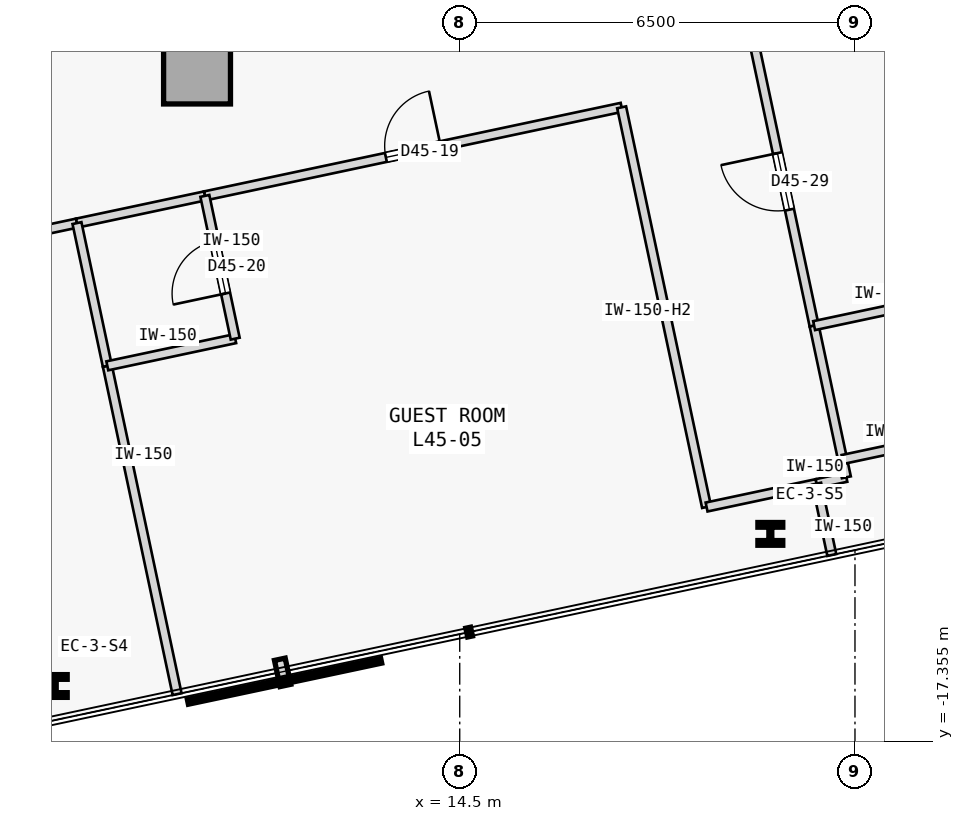
"""IFC4 building model, lengths in metres.
Left out: names, types, materials, properties, quantities, classifications, styles, units other than length and angle.
Written with IfcOpenShell. Run it as: python <this file> out.ifc"""

import sys

from ifc_helpers import new_model, si_unit, direction, frame, frame_2d, origin, origin_2d, place, context, subcontext, project, spatial, rectangle, i_section, extrude, element, fill, save


model = new_model("IFC4")
c1 = context("Model", 3, precision=1e-05, world=origin(), true_north=direction((0.0, 1.0)))
c2 = subcontext(c1, "Body", "Model", "MODEL_VIEW")
j1 = project(units=[si_unit("LENGTHUNIT", "METRE"), si_unit("PLANEANGLEUNIT", "RADIAN")], contexts=[c1])
p1 = place(None, origin())
s1 = spatial("IfcSite", under=j1, at=p1, CompositionType="ELEMENT")
p2 = place(p1, origin())
s2 = spatial("IfcBuilding", under=s1, at=p2, CompositionType="ELEMENT")
p3 = place(p2, frame((0.0, 0.0, 175.2)))
s3 = spatial("IfcBuildingStorey", under=s2, at=p3, CompositionType="ELEMENT", Elevation=175.2)
p4 = place(p3, frame((10.18, -6.32, 0.0), z_axis=(0.0, 0.0, 1.0), x_axis=(1.0, 0.0, 0.0)))
e1 = element("IfcColumn", 1, at=p4, inside=s3, PredefinedType="COLUMN", context=c2, shape_type="SweptSolid", body=[
    extrude(rectangle(XDim=1.1, YDim=1.1, at=origin_2d()), origin(), (0.0, 0.0, 1.0), 3.4),
])
for number, where, z_axis, x_axis in (
    (2, (7.84, -16.441, 0.0), (0.0, 0.0, 1.0), (1.0, 0.0, 0.0)),
    (3, (19.608, -13.94, 0.0), (0.0, 0.0, 1.0), (1.0, 0.0, 0.0)),
):
    element("IfcColumn", number, at=place(p3, frame(where, z_axis=z_axis, x_axis=x_axis)), inside=s3, PredefinedType="COLUMN", context=c2, shape_type="SweptSolid", body=[
        extrude(i_section(OverallWidth=0.409, OverallDepth=0.374, WebThickness=0.048, FlangeThickness=0.077, FilletRadius=0.015, at=origin_2d()), origin(), (0.0, 0.0, 1.0), 3.4),
    ])
p5 = place(p3, frame((-1.803, -10.957, 0.0), z_axis=(0.0, 0.0, 1.0), x_axis=(0.978145386425, 0.207922108048, 0.0)))
e4 = element("IfcWall", 4, at=p5, inside=s3, PredefinedType="PARTITIONING", context=c2, shape_type="SweptSolid", body=[
    extrude(rectangle(XDim=10.232, YDim=0.15, at=frame_2d((5.116, 0.0))), origin(), (0.0, 0.0, 1.0), 3.175),
])
p6 = place(p5, frame((4.656, 0.0, 0.0)))
e5 = element("IfcOpeningElement", 5, at=p6, cuts=e4, PredefinedType="OPENING", context=c2, shape_type="SweptSolid", body=[
    extrude(rectangle(XDim=0.92, YDim=2.15, at=frame_2d((0.46, 1.075))), frame((0.0, 0.085, 0.0), z_axis=(0.0, -1.0, 0.0), x_axis=(1.0, 0.0, 0.0)), (0.0, 0.0, 1.0), 0.17),
])
p7 = place(p3, frame((10.309, -8.382, 0.0), z_axis=(0.0, 0.0, 1.0), x_axis=(0.978149817889, 0.207901259648, 0.0)))
e6 = element("IfcWall", 6, at=p7, inside=s3, PredefinedType="PARTITIONING", context=c2, shape_type="SweptSolid", body=[
    extrude(rectangle(XDim=7.007, YDim=0.15, at=frame_2d((3.503, 0.0))), origin(), (0.0, 0.0, 1.0), 3.175),
])
p8 = place(p7, frame((3.043, 0.0, 0.0)))
e7 = element("IfcOpeningElement", 7, at=p8, cuts=e6, PredefinedType="OPENING", context=c2, shape_type="SweptSolid", body=[
    extrude(rectangle(XDim=0.92, YDim=2.15, at=frame_2d((0.46, 1.075))), frame((0.0, 0.085, 0.0), z_axis=(0.0, -1.0, 0.0), x_axis=(1.0, 0.0, 0.0)), (0.0, 0.0, 1.0), 0.17),
])
p9 = place(p3, frame((18.56, -13.498, 0.0), z_axis=(0.0, 0.0, 1.0), x_axis=(-0.207888737749, 0.978152479278, 0.0)))
e8 = element("IfcWall", 8, at=p9, inside=s3, PredefinedType="PARTITIONING", context=c2, shape_type="SweptSolid", body=[
    extrude(rectangle(XDim=6.72, YDim=0.15, at=frame_2d((3.36, 0.0))), origin(), (0.0, 0.0, 1.0), 2.575),
])
p10 = place(p3, frame((18.56, -13.498, 0.0), z_axis=(0.0, 0.0, 1.0), x_axis=(0.978160192495, 0.207852442415, 0.0)))
e9 = element("IfcWall", 9, at=p10, inside=s3, PredefinedType="PARTITIONING", context=c2, shape_type="SweptSolid", body=[
    extrude(rectangle(XDim=1.85, YDim=0.15, at=frame_2d((0.925, 0.0))), origin(), (0.0, 0.0, 1.0), 3.175),
])
p11 = place(p3, frame((8.206, -8.829, 0.0), z_axis=(0.0, 0.0, 1.0), x_axis=(0.978146728319, 0.207915795165, 0.0)))
e10 = element("IfcWall", 10, at=p11, inside=s3, PredefinedType="PARTITIONING", context=c2, shape_type="SweptSolid", body=[
    extrude(rectangle(XDim=2.15, YDim=0.15, at=frame_2d((1.075, 0.0))), origin(), (0.0, 0.0, 1.0), 3.175),
])
p12 = place(p3, frame((20.369, -13.114, 0.0), z_axis=(0.0, 0.0, 1.0), x_axis=(0.978143962546, 0.207928806409, 0.0)))
e11 = element("IfcWall", 11, at=p12, inside=s3, PredefinedType="PARTITIONING", context=c2, shape_type="SweptSolid", body=[
    extrude(rectangle(XDim=0.5, YDim=0.15, at=frame_2d((0.25, 0.0))), origin(), (0.0, 0.0, 1.0), 3.175),
])
p13 = place(p3, frame((20.858, -13.01, 0.0), z_axis=(0.0, 0.0, 1.0), x_axis=(-0.208306395052, 0.978063620518, 0.0)))
e12 = element("IfcWall", 12, at=p13, inside=s3, PredefinedType="PARTITIONING", context=c2, shape_type="SweptSolid", body=[
    extrude(rectangle(XDim=0.3, YDim=0.15, at=frame_2d((0.15, 0.0))), origin(), (0.0, 0.0, 1.0), 3.175),
])
p14 = place(p3, frame((20.328, -10.515, 0.0), z_axis=(0.0, 0.0, 1.0), x_axis=(-0.207950868925, 0.97813927235, 0.0)))
e13 = element("IfcWall", 13, at=p14, inside=s3, PredefinedType="PARTITIONING", context=c2, shape_type="SweptSolid", body=[
    extrude(rectangle(XDim=4.85, YDim=0.15, at=frame_2d((2.425, 0.0))), origin(), (0.0, 0.0, 1.0), 3.175),
])
p15 = place(p14, frame((1.95, 0.0, 0.0)))
e14 = element("IfcOpeningElement", 14, at=p15, cuts=e13, PredefinedType="OPENING", context=c2, shape_type="SweptSolid", body=[
    extrude(rectangle(XDim=0.95, YDim=2.15, at=frame_2d((0.475, 1.075))), frame((0.0, 0.085, 0.0), z_axis=(0.0, -1.0, 0.0), x_axis=(1.0, 0.0, 0.0)), (0.0, 0.0, 1.0), 0.17),
])
p16 = place(p3, frame((20.796, -12.716, 0.0), z_axis=(0.0, 0.0, 1.0), x_axis=(-0.207891197838, 0.978151956427, 0.0)))
e15 = element("IfcWall", 15, at=p16, inside=s3, PredefinedType="PARTITIONING", context=c2, shape_type="SweptSolid", body=[
    extrude(rectangle(XDim=2.25, YDim=0.15, at=frame_2d((1.125, 0.0))), origin(), (0.0, 0.0, 1.0), 3.175),
])
p17 = place(p3, frame((9.852, -16.576, 0.0), z_axis=(0.0, 0.0, 1.0), x_axis=(-0.20792487872, 0.978144797466, 0.0)))
e16 = element("IfcWall", 16, at=p17, inside=s3, PredefinedType="PARTITIONING", context=c2, shape_type="SweptSolid", body=[
    extrude(rectangle(XDim=5.52, YDim=0.15, at=frame_2d((2.76, 0.0))), origin(), (0.0, 0.0, 1.0), 3.175),
])
p18 = place(p3, frame((8.705, -11.177, 0.0), z_axis=(0.0, 0.0, 1.0), x_axis=(-0.207917150959, 0.978146440129, 0.0)))
e17 = element("IfcWall", 17, at=p18, inside=s3, PredefinedType="PARTITIONING", context=c2, shape_type="SweptSolid", body=[
    extrude(rectangle(XDim=2.4, YDim=0.15, at=frame_2d((1.2, 0.0))), origin(), (0.0, 0.0, 1.0), 3.175),
])
p19 = place(p3, frame((8.705, -11.177, 0.0), z_axis=(0.0, 0.0, 1.0), x_axis=(0.978123629285, 0.208024435669, 0.0)))
e18 = element("IfcWall", 18, at=p19, inside=s3, PredefinedType="PARTITIONING", context=c2, shape_type="SweptSolid", body=[
    extrude(rectangle(XDim=2.15, YDim=0.15, at=frame_2d((1.075, 0.0))), origin(), (0.0, 0.0, 1.0), 3.175),
])
p20 = place(p3, frame((10.808, -10.729, 0.0), z_axis=(0.0, 0.0, 1.0), x_axis=(-0.207937840262, 0.978142042133, 0.0)))
e19 = element("IfcWall", 19, at=p20, inside=s3, PredefinedType="PARTITIONING", context=c2, shape_type="SweptSolid", body=[
    extrude(rectangle(XDim=2.4, YDim=0.15, at=frame_2d((1.2, 0.0))), origin(), (0.0, 0.0, 1.0), 3.175),
])
p21 = place(p20, frame((0.76, 0.0, 0.0)))
e20 = element("IfcOpeningElement", 20, at=p21, cuts=e19, PredefinedType="OPENING", context=c2, shape_type="SweptSolid", body=[
    extrude(rectangle(XDim=0.88, YDim=2.15, at=frame_2d((0.44, 1.075))), frame((0.0, 0.085, 0.0), z_axis=(0.0, -1.0, 0.0), x_axis=(1.0, 0.0, 0.0)), (0.0, 0.0, 1.0), 0.17),
])
p22 = place(p3, frame((20.619, -14.288, 0.0), z_axis=(0.0, 0.0, 1.0), x_axis=(-0.207917150959, 0.978146440129, 0.0)))
e21 = element("IfcWall", 21, at=p22, inside=s3, PredefinedType="PARTITIONING", context=c2, shape_type="SweptSolid", body=[
    extrude(rectangle(XDim=1.2, YDim=0.15, at=frame_2d((0.6, 0.0))), origin(), (0.0, 0.0, 1.0), 3.175),
])
for number, where, z_axis, x_axis in (
    (22, (20.796, -12.716, 0.0), (0.0, 0.0, 1.0), (0.978, 0.208, 0.0)),
    (23, (20.328, -10.515, 0.0), (0.0, 0.0, 1.0), (0.978, 0.208, 0.0)),
):
    element("IfcWall", number, at=place(p3, frame(where, z_axis=z_axis, x_axis=x_axis)), inside=s3, PredefinedType="PARTITIONING", context=c2, shape_type="SweptSolid", body=[
        extrude(rectangle(XDim=1.85, YDim=0.15, at=frame_2d((0.925, 0.0))), origin(), (0.0, 0.0, 1.0), 3.175),
    ])
p23 = place(p8, origin())
e24 = element("IfcDoor", 24, at=p23, inside=s3, OperationType="SINGLE_SWING_RIGHT", PredefinedType="DOOR", context=c2, shape_type="SweptSolid", body=[
    extrude(rectangle(XDim=0.92, YDim=2.15, at=frame_2d((0.46, 1.075))), frame((0.0, 0.025, 0.0), z_axis=(0.0, -1.0, 0.0), x_axis=(1.0, 0.0, 0.0)), (0.0, 0.0, 1.0), 0.05),
])
fill(e7, e24)
p24 = place(p21, origin())
e25 = element("IfcDoor", 25, at=p24, inside=s3, OperationType="SINGLE_SWING_LEFT", PredefinedType="DOOR", context=c2, shape_type="SweptSolid", body=[
    extrude(rectangle(XDim=0.88, YDim=2.15, at=frame_2d((0.44, 1.075))), frame((0.0, 0.025, 0.0), z_axis=(0.0, -1.0, 0.0), x_axis=(1.0, 0.0, 0.0)), (0.0, 0.0, 1.0), 0.05),
])
fill(e20, e25)
p25 = place(p15, origin())
e26 = element("IfcDoor", 26, at=p25, inside=s3, OperationType="SINGLE_SWING_RIGHT", PredefinedType="DOOR", context=c2, shape_type="SweptSolid", body=[
    extrude(rectangle(XDim=0.95, YDim=2.15, at=frame_2d((0.475, 1.075))), frame((0.0, 0.025, 0.0), z_axis=(0.0, -1.0, 0.0), x_axis=(1.0, 0.0, 0.0)), (0.0, 0.0, 1.0), 0.05),
])
fill(e14, e26)
save(model, sys.argv[1])
